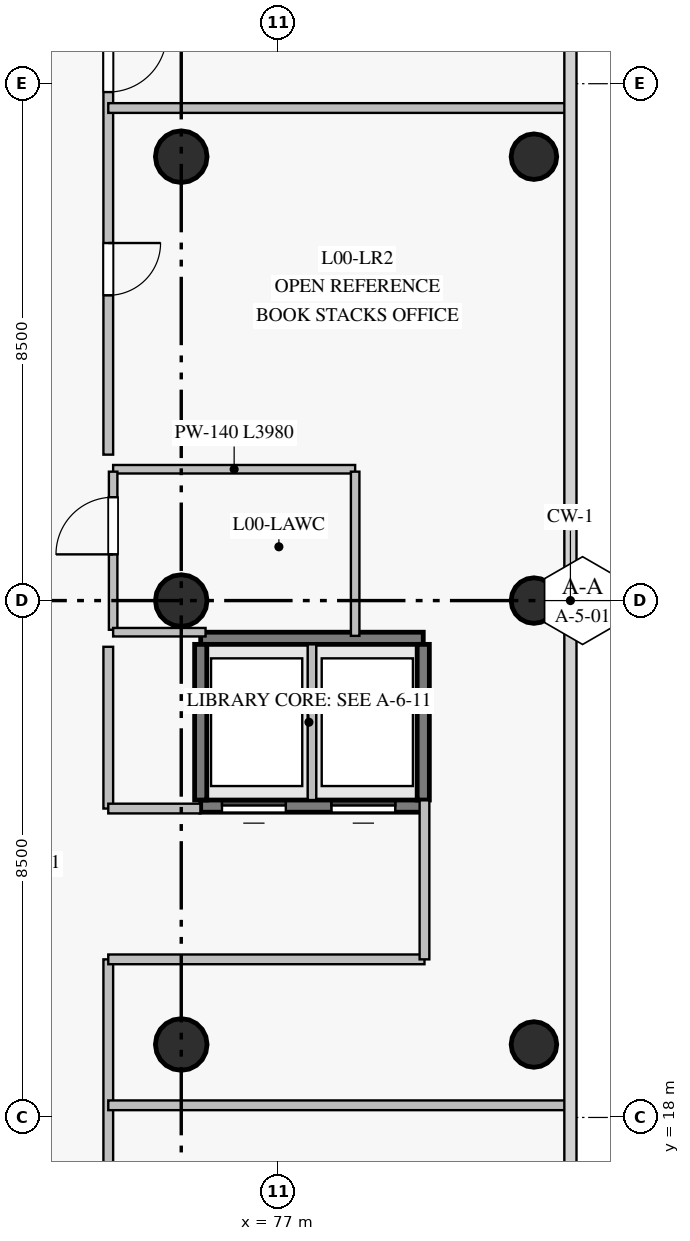
"""IFC4 building model, lengths in metres.
Left out: names, types, materials, properties, quantities, classifications, styles, units other than length and angle.
Written with IfcOpenShell. Run it as: python <this file> out.ifc"""

import sys

from ifc_helpers import new_model, si_unit, direction, frame, frame_2d, origin, origin_with_axes, origin_2d, place, context, subcontext, project, spatial, rectangle, circle, extrude, source, transform, mapped, element, fill, save


model = new_model("IFC4")
c1 = context("Model", 3, precision=1e-05, world=origin(), true_north=direction((0.0, 1.0)))
c2 = subcontext(c1, "Body", "Model", "MODEL_VIEW")
j1 = project(units=[si_unit("LENGTHUNIT", "METRE"), si_unit("PLANEANGLEUNIT", "RADIAN")], contexts=[c1])
p1 = place(None, origin())
s1 = spatial("IfcSite", under=j1, at=p1, CompositionType="ELEMENT")
p2 = place(p1, origin())
s2 = spatial("IfcBuilding", under=s1, at=p2, CompositionType="ELEMENT")
p3 = place(p2, origin())
s3 = spatial("IfcBuildingStorey", under=s2, at=p3, CompositionType="ELEMENT", Elevation=0.0)
m1 = source(origin_with_axes(), c2, "Body", "SweptSolid", [
    extrude(circle(Radius=0.425, at=origin_2d()), origin(), (0.0, 0.0, 1.0), 4.5),
])
for number, where, z_axis, x_axis in (
    (1, (75.4, 19.2, 0.0), (0.0, 0.0, 1.0), (1.0, 0.0, 0.0)),
    (2, (75.4, 26.5, 0.0), (0.0, 0.0, 1.0), (1.0, 0.0, 0.0)),
    (3, (75.4, 33.8, 0.0), (0.0, 0.0, 1.0), (1.0, 0.0, 0.0)),
):
    element("IfcColumn", number, at=place(p3, frame(where, z_axis=z_axis, x_axis=x_axis)), inside=s3, PredefinedType="COLUMN", context=c2, shape_type="MappedRepresentation", body=[
        mapped(m1, transform((0.0, 0.0, 0.0), scale=1.0)),
    ])
m2 = source(origin_with_axes(), c2, "Body", "SweptSolid", [
    extrude(circle(Radius=0.375, at=origin_2d()), origin(), (0.0, 0.0, 1.0), 4.5),
])
for number, where, z_axis, x_axis in (
    (4, (81.2, 19.2, 0.0), (0.0, 0.0, 1.0), (1.0, 0.0, 0.0)),
    (5, (81.2, 26.5, 0.0), (0.0, 0.0, 1.0), (1.0, 0.0, 0.0)),
    (6, (81.2, 33.8, 0.0), (0.0, 0.0, 1.0), (1.0, 0.0, 0.0)),
):
    element("IfcColumn", number, at=place(p3, frame(where, z_axis=z_axis, x_axis=x_axis)), inside=s3, PredefinedType="COLUMN", context=c2, shape_type="MappedRepresentation", body=[
        mapped(m2, transform((0.0, 0.0, 0.0), scale=1.0)),
    ])
p4 = place(p3, frame((75.72, 23.12, 0.0), z_axis=(0.0, 0.0, 1.0), x_axis=(1.0, 0.0, 0.0)))
e7 = element("IfcWall", 7, at=p4, inside=s3, PredefinedType="SHEAR", context=c2, shape_type="SweptSolid", body=[
    extrude(rectangle(XDim=3.66, YDim=0.2, at=frame_2d((1.83, 0.0))), origin(), (0.0, 0.0, 1.0), 4.2),
])
p5 = place(p4, frame((0.35, 0.0, 0.0)))
e8 = element("IfcOpeningElement", 8, at=p5, cuts=e7, PredefinedType="OPENING", context=c2, shape_type="SweptSolid", body=[
    extrude(rectangle(XDim=1.05, YDim=2.15, at=frame_2d((0.525, 1.075))), frame((0.0, 0.11, 0.0), z_axis=(0.0, -1.0, 0.0), x_axis=(1.0, 0.0, 0.0)), (0.0, 0.0, 1.0), 0.22),
])
p6 = place(p4, frame((2.15, 0.0, 0.0)))
e9 = element("IfcOpeningElement", 9, at=p6, cuts=e7, PredefinedType="OPENING", context=c2, shape_type="SweptSolid", body=[
    extrude(rectangle(XDim=1.05, YDim=2.15, at=frame_2d((0.525, 1.075))), frame((0.0, 0.11, 0.0), z_axis=(0.0, -1.0, 0.0), x_axis=(1.0, 0.0, 0.0)), (0.0, 0.0, 1.0), 0.22),
])
p7 = place(p3, frame((75.72, 25.88, 0.0), z_axis=(0.0, 0.0, 1.0), x_axis=(1.0, 0.0, 0.0)))
e10 = element("IfcWall", 10, at=p7, inside=s3, PredefinedType="SHEAR", context=c2, shape_type="SweptSolid", body=[
    extrude(rectangle(XDim=3.66, YDim=0.2, at=frame_2d((1.83, 0.0))), origin(), (0.0, 0.0, 1.0), 4.2),
])
for number, where, z_axis, x_axis in (
    (11, (75.72, 23.22, 0.0), (0.0, 0.0, 1.0), (0.0, 1.0, 0.0)),
    (12, (79.38, 23.22, 0.0), (0.0, 0.0, 1.0), (0.0, 1.0, 0.0)),
):
    element("IfcWall", number, at=place(p3, frame(where, z_axis=z_axis, x_axis=x_axis)), inside=s3, PredefinedType="SHEAR", context=c2, shape_type="SweptSolid", body=[
        extrude(rectangle(XDim=2.56, YDim=0.2, at=frame_2d((1.28, 0.0))), origin(), (0.0, 0.0, 1.0), 4.2),
    ])
p8 = place(p3, frame((74.2, 44.038, 0.0), z_axis=(0.0, 0.0, 1.0), x_axis=(0.0, -1.0, 0.0)))
e13 = element("IfcWall", 13, at=p8, inside=s3, PredefinedType="PARTITIONING", context=c2, shape_type="SweptSolid", body=[
    extrude(rectangle(XDim=15.138, YDim=0.16, at=frame_2d((7.569, 0.0))), origin(), (0.0, 0.0, 1.0), 4.2),
])
p9 = place(p8, frame((8.216, 0.0, 0.0)))
e14 = element("IfcOpeningElement", 14, at=p9, cuts=e13, PredefinedType="OPENING", context=c2, shape_type="SweptSolid", body=[
    extrude(rectangle(XDim=0.96, YDim=2.15, at=frame_2d((0.48, 1.075))), frame((0.0, 0.09, 0.0), z_axis=(0.0, -1.0, 0.0), x_axis=(1.0, 0.0, 0.0)), (0.0, 0.0, 1.0), 0.18),
])
p10 = place(p8, frame((7.01, 0.0, 0.0)))
e15 = element("IfcOpeningElement", 15, at=p10, cuts=e13, PredefinedType="OPENING", context=c2, shape_type="SweptSolid", body=[
    extrude(rectangle(XDim=0.96, YDim=2.15, at=frame_2d((0.48, 1.075))), frame((0.0, 0.09, 0.0), z_axis=(0.0, -1.0, 0.0), x_axis=(1.0, 0.0, 0.0)), (0.0, 0.0, 1.0), 0.18),
])
p11 = place(p8, frame((11.658, 0.0, 0.0)))
e16 = element("IfcOpeningElement", 16, at=p11, cuts=e13, PredefinedType="OPENING", context=c2, shape_type="SweptSolid", body=[
    extrude(rectangle(XDim=0.86, YDim=2.04, at=frame_2d((0.43, 1.02))), frame((0.0, 0.09, 0.0), z_axis=(0.0, -1.0, 0.0), x_axis=(1.0, 0.0, 0.0)), (0.0, 0.0, 1.0), 0.18),
])
p12 = place(p3, frame((74.2, 20.6, 0.0), z_axis=(0.0, 0.0, 1.0), x_axis=(0.0, -1.0, 0.0)))
e17 = element("IfcWall", 17, at=p12, inside=s3, PredefinedType="PARTITIONING", context=c2, shape_type="SweptSolid", body=[
    extrude(rectangle(XDim=11.678, YDim=0.16, at=frame_2d((5.839, 0.0))), origin(), (0.0, 0.0, 1.0), 4.2),
])
p13 = place(p12, frame((5.28, 0.0, 0.0)))
e18 = element("IfcOpeningElement", 18, at=p13, cuts=e17, PredefinedType="OPENING", context=c2, shape_type="SweptSolid", body=[
    extrude(rectangle(XDim=0.96, YDim=2.15, at=frame_2d((0.48, 1.075))), frame((0.0, 0.09, 0.0), z_axis=(0.0, -1.0, 0.0), x_axis=(1.0, 0.0, 0.0)), (0.0, 0.0, 1.0), 0.18),
])
for number, where, z_axis, x_axis in (
    (19, (74.2, 18.2, 0.0), (0.0, 0.0, 1.0), (1.0, 0.0, 0.0)),
    (20, (74.2, 34.6, 0.0), (0.0, 0.0, 1.0), (1.0, 0.0, 0.0)),
):
    element("IfcWall", number, at=place(p3, frame(where, z_axis=z_axis, x_axis=x_axis)), inside=s3, PredefinedType="PARTITIONING", context=c2, shape_type="SweptSolid", body=[
        extrude(rectangle(XDim=7.545, YDim=0.16, at=frame_2d((3.772, 0.0))), origin(), (0.0, 0.0, 1.0), 4.2),
    ])
p14 = place(p3, frame((79.4, 20.6, 0.0), z_axis=(0.0, 0.0, 1.0), x_axis=(-1.0, 0.0, 0.0)))
e21 = element("IfcWall", 21, at=p14, inside=s3, PredefinedType="PARTITIONING", context=c2, shape_type="SweptSolid", body=[
    extrude(rectangle(XDim=5.2, YDim=0.16, at=frame_2d((2.6, 0.0))), origin(), (0.0, 0.0, 1.0), 4.2),
])
p15 = place(p3, frame((74.28, 28.66, 0.0), z_axis=(0.0, 0.0, 1.0), x_axis=(1.0, 0.0, 0.0)))
e22 = element("IfcWall", 22, at=p15, inside=s3, PredefinedType="PARTITIONING", context=c2, shape_type="SweptSolid", body=[
    extrude(rectangle(XDim=3.98, YDim=0.14, at=frame_2d((1.99, 0.0))), origin(), (0.0, 0.0, 1.0), 4.2),
])
p16 = place(p3, frame((78.26, 25.92, 0.0), z_axis=(0.0, 0.0, 1.0), x_axis=(0.0, 1.0, 0.0)))
e23 = element("IfcWall", 23, at=p16, inside=s3, PredefinedType="PARTITIONING", context=c2, shape_type="SweptSolid", body=[
    extrude(rectangle(XDim=2.7, YDim=0.14, at=frame_2d((1.35, 0.0))), origin(), (0.0, 0.0, 1.0), 4.2),
])
p17 = place(p3, frame((74.2, 25.74, 0.0), z_axis=(0.0, 0.0, 1.0), x_axis=(0.0, -1.0, 0.0)))
e24 = element("IfcWall", 24, at=p17, inside=s3, PredefinedType="PARTITIONING", context=c2, shape_type="SweptSolid", body=[
    extrude(rectangle(XDim=2.66, YDim=0.16, at=frame_2d((1.33, 0.0))), origin(), (0.0, 0.0, 1.0), 4.2),
])
p18 = place(p3, frame((74.28, 26.02, 0.0), z_axis=(0.0, 0.0, 1.0), x_axis=(0.0, 1.0, 0.0)))
e25 = element("IfcWall", 25, at=p18, inside=s3, PredefinedType="PARTITIONING", context=c2, shape_type="SweptSolid", body=[
    extrude(rectangle(XDim=2.6, YDim=0.14, at=frame_2d((1.3, 0.0))), origin(), (0.0, 0.0, 1.0), 4.2),
])
p19 = place(p18, frame((1.24, 0.0, 0.0)))
e26 = element("IfcOpeningElement", 26, at=p19, cuts=e25, PredefinedType="OPENING", context=c2, shape_type="SweptSolid", body=[
    extrude(rectangle(XDim=0.94, YDim=2.1, at=frame_2d((0.47, 1.05))), frame((0.0, 0.08, 0.0), z_axis=(0.0, -1.0, 0.0), x_axis=(1.0, 0.0, 0.0)), (0.0, 0.0, 1.0), 0.16),
])
p20 = place(p3, frame((77.55, 23.22, 0.0), z_axis=(0.0, 0.0, 1.0), x_axis=(0.0, 1.0, 0.0)))
e27 = element("IfcWall", 27, at=p20, inside=s3, PredefinedType="PARTITIONING", context=c2, shape_type="SweptSolid", body=[
    extrude(rectangle(XDim=2.56, YDim=0.14, at=frame_2d((1.28, 0.0))), origin(), (0.0, 0.0, 1.0), 4.2),
])
p21 = place(p3, frame((79.4, 23.215, 0.0), z_axis=(0.0, 0.0, 1.0), x_axis=(0.0, -1.0, 0.0)))
e28 = element("IfcWall", 28, at=p21, inside=s3, PredefinedType="PARTITIONING", context=c2, shape_type="SweptSolid", body=[
    extrude(rectangle(XDim=2.615, YDim=0.16, at=frame_2d((1.308, 0.0))), origin(), (0.0, 0.0, 1.0), 4.2),
])
p22 = place(p3, frame((74.28, 25.98, 0.0), z_axis=(0.0, 0.0, 1.0), x_axis=(1.0, 0.0, 0.0)))
e29 = element("IfcWall", 29, at=p22, inside=s3, PredefinedType="PARTITIONING", context=c2, shape_type="SweptSolid", body=[
    extrude(rectangle(XDim=1.52, YDim=0.14, at=frame_2d((0.76, 0.0))), origin(), (0.0, 0.0, 1.0), 3.55),
])
p23 = place(p3, frame((74.2, 23.08, 0.0), z_axis=(0.0, 0.0, 1.0), x_axis=(1.0, 0.0, 0.0)))
e30 = element("IfcWall", 30, at=p23, inside=s3, PredefinedType="PARTITIONING", context=c2, shape_type="SweptSolid", body=[
    extrude(rectangle(XDim=1.515, YDim=0.16, at=frame_2d((0.758, 0.0))), origin(), (0.0, 0.0, 1.0), 4.2),
])
m3 = source(origin_with_axes(), c2, "Body", "SweptSolid", [
    extrude(rectangle(XDim=1.05, YDim=2.15, at=frame_2d((0.525, 1.075))), frame((0.0, 0.025, 0.0), z_axis=(0.0, -1.0, 0.0), x_axis=(1.0, 0.0, 0.0)), (0.0, 0.0, 1.0), 0.05),
])
p24 = place(p5, origin())
e31 = element("IfcDoor", 31, at=p24, inside=s3, OperationType="SLIDING_TO_LEFT", PredefinedType="DOOR", context=c2, shape_type="MappedRepresentation", body=[
    mapped(m3, transform((0.0, 0.0, 0.0), scale=1.0)),
])
fill(e8, e31)
p25 = place(p6, origin())
e32 = element("IfcDoor", 32, at=p25, inside=s3, OperationType="SLIDING_TO_RIGHT", PredefinedType="DOOR", context=c2, shape_type="MappedRepresentation", body=[
    mapped(m3, transform((0.0, 0.0, 0.0), scale=1.0)),
])
fill(e9, e32)
m4 = source(origin_with_axes(), c2, "Body", "SweptSolid", [
    extrude(rectangle(XDim=0.94, YDim=2.1, at=frame_2d((0.47, 1.05))), frame((0.0, 0.025, 0.0), z_axis=(0.0, -1.0, 0.0), x_axis=(1.0, 0.0, 0.0)), (0.0, 0.0, 1.0), 0.05),
])
p26 = place(p19, origin())
e33 = element("IfcDoor", 33, at=p26, inside=s3, OperationType="SINGLE_SWING_LEFT", PredefinedType="DOOR", context=c2, shape_type="MappedRepresentation", body=[
    mapped(m4, transform((0.0, 0.0, 0.0), scale=1.0)),
])
fill(e26, e33)
m5 = source(origin_with_axes(), c2, "Body", "SweptSolid", [
    extrude(rectangle(XDim=0.96, YDim=2.15, at=frame_2d((0.48, 1.075))), frame((0.0, 0.025, 0.0), z_axis=(0.0, -1.0, 0.0), x_axis=(1.0, 0.0, 0.0)), (0.0, 0.0, 1.0), 0.05),
])
p27 = place(p9, origin())
e34 = element("IfcDoor", 34, at=p27, inside=s3, OperationType="SINGLE_SWING_LEFT", PredefinedType="DOOR", context=c2, shape_type="MappedRepresentation", body=[
    mapped(m5, transform((0.0, 0.0, 0.0), scale=1.0)),
])
fill(e14, e34)
m6 = source(origin_with_axes(), c2, "Body", "SweptSolid", [
    extrude(rectangle(XDim=0.86, YDim=2.04, at=frame_2d((0.43, 1.02))), frame((0.0, 0.025, 0.0), z_axis=(0.0, -1.0, 0.0), x_axis=(1.0, 0.0, 0.0)), (0.0, 0.0, 1.0), 0.05),
])
p28 = place(p11, origin())
e35 = element("IfcDoor", 35, at=p28, inside=s3, OperationType="SINGLE_SWING_LEFT", PredefinedType="DOOR", context=c2, shape_type="MappedRepresentation", body=[
    mapped(m6, transform((0.0, 0.0, 0.0), scale=1.0)),
])
fill(e16, e35)
save(model, sys.argv[1])
